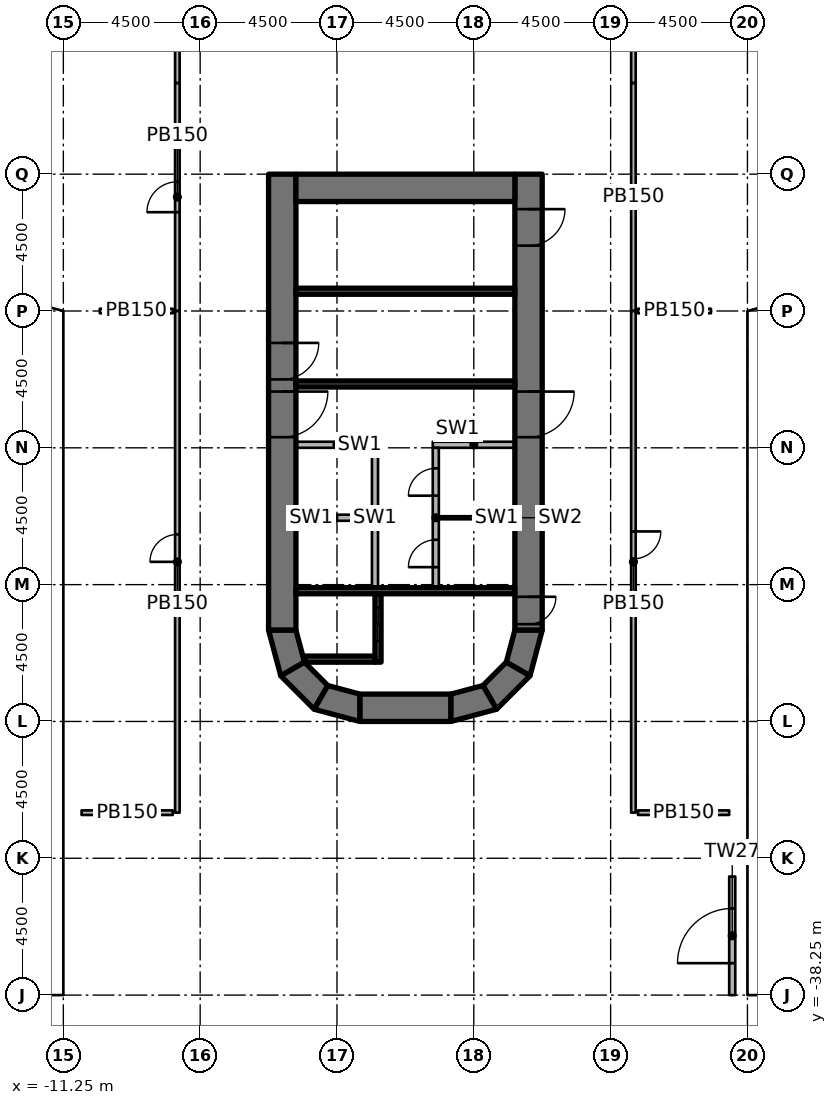
"""IFC4 building model, lengths in metres.
Left out: names, types, materials, properties, quantities, classifications, styles, units other than length and angle.
Written with IfcOpenShell. Run it as: python <this file> out.ifc"""

import sys

from ifc_helpers import new_model, si_unit, direction, frame, frame_2d, origin, origin_2d, place, context, subcontext, project, spatial, polyline, rectangle, outline, extrude, element, fill, save


model = new_model("IFC4")
c1 = context("Model", 3, precision=1e-05, world=origin(), true_north=direction((0.0, 1.0)))
c2 = subcontext(c1, "Body", "Model", "MODEL_VIEW")
j1 = project(units=[si_unit("LENGTHUNIT", "METRE"), si_unit("PLANEANGLEUNIT", "RADIAN")], contexts=[c1])
p1 = place(None, origin())
s1 = spatial("IfcSite", under=j1, at=p1, CompositionType="ELEMENT")
p2 = place(p1, origin())
s2 = spatial("IfcBuilding", under=s1, at=p2, CompositionType="ELEMENT")
p3 = place(p2, frame((0.0, 0.0, 22.0)))
s3 = spatial("IfcBuildingStorey", under=s2, at=p3, CompositionType="ELEMENT", Elevation=22.0)
for number, where, z_axis, x_axis in (
    (1, (-10.65, -38.85, 0.0), (0.0, 0.0, 1.0), (1.0, 0.0, 0.0)),
    (2, (-10.65, -24.75, 0.0), (0.0, 0.0, 1.0), (1.0, 0.0, 0.0)),
    (3, (-10.65, -15.15, 0.0), (0.0, 0.0, 1.0), (1.0, 0.0, 0.0)),
):
    element("IfcColumn", number, at=place(p3, frame(where, z_axis=z_axis, x_axis=x_axis)), inside=s3, PredefinedType="COLUMN", context=c2, shape_type="SweptSolid", body=[
        extrude(rectangle(XDim=1.2, YDim=1.2, at=origin_2d()), origin(), (0.0, 0.0, 1.0), 4.55),
    ])
for number, where, z_axis, x_axis in (
    (4, (-6.25, -26.9, 0.0), (0.0, 0.0, 1.0), (1.0, 0.0, 0.0)),
    (5, (-6.25, -24.65, 0.0), (0.0, 0.0, 1.0), (1.0, 0.0, 0.0)),
    (6, (-6.25, -20.25, 0.0), (0.0, 0.0, 1.0), (1.0, 0.0, 0.0)),
    (7, (-6.25, -15.75, 0.0), (0.0, 0.0, 1.0), (1.0, 0.0, 0.0)),
    (8, (-6.25, -10.75, 0.0), (0.0, 0.0, 1.0), (1.0, 0.0, 0.0)),
    (9, (-2.25, -33.11, 0.0), (0.0, 0.0, 1.0), (1.0, 0.0, 0.0)),
    (10, (2.25, -33.11, 0.0), (0.0, 0.0, 1.0), (1.0, 0.0, 0.0)),
    (11, (6.25, -26.9, 0.0), (0.0, 0.0, 1.0), (1.0, 0.0, 0.0)),
    (12, (6.25, -24.65, 0.0), (0.0, 0.0, 1.0), (1.0, 0.0, 0.0)),
    (13, (6.25, -20.25, 0.0), (0.0, 0.0, 1.0), (1.0, 0.0, 0.0)),
    (14, (6.25, -15.75, 0.0), (0.0, 0.0, 1.0), (1.0, 0.0, 0.0)),
    (15, (6.25, -10.75, 0.0), (0.0, 0.0, 1.0), (1.0, 0.0, 0.0)),
):
    element("IfcColumn", number, at=place(p3, frame(where, z_axis=z_axis, x_axis=x_axis)), inside=s3, PredefinedType="COLUMN", context=c2, shape_type="SweptSolid", body=[
        extrude(rectangle(XDim=1.2, YDim=1.2, at=origin_2d()), origin(), (0.0, 0.0, 1.0), 4.85),
    ])
for number, where, z_axis, x_axis in (
    (16, (10.65, -38.85, 0.0), (0.0, 0.0, 1.0), (1.0, 0.0, 0.0)),
    (17, (10.65, -33.75, 0.0), (0.0, 0.0, 1.0), (1.0, 0.0, 0.0)),
    (18, (10.65, -20.25, 0.0), (0.0, 0.0, 1.0), (1.0, 0.0, 0.0)),
    (19, (10.65, -15.15, 0.0), (0.0, 0.0, 1.0), (1.0, 0.0, 0.0)),
):
    element("IfcColumn", number, at=place(p3, frame(where, z_axis=z_axis, x_axis=x_axis)), inside=s3, PredefinedType="COLUMN", context=c2, shape_type="SweptSolid", body=[
        extrude(rectangle(XDim=1.2, YDim=1.2, at=origin_2d()), origin(), (0.0, 0.0, 1.0), 4.55),
    ])
p4 = place(p3, frame((-4.05, -11.25, 0.0), z_axis=(0.0, 0.0, 1.0), x_axis=(0.0, -1.0, 0.0)))
e20 = element("IfcWall", 20, at=p4, inside=s3, PredefinedType="SHEAR", context=c2, shape_type="SweptSolid", body=[
    extrude(rectangle(XDim=15.0, YDim=0.9, at=frame_2d((7.5, 0.0))), origin(), (0.0, 0.0, 1.0), 5.0),
])
p5 = place(p4, frame((7.15, 0.0, 0.0)))
e21 = element("IfcOpeningElement", 21, at=p5, cuts=e20, PredefinedType="OPENING", context=c2, shape_type="SweptSolid", body=[
    extrude(rectangle(XDim=1.5, YDim=2.3, at=frame_2d((0.75, 1.15))), frame((0.0, 0.46, 0.0), z_axis=(0.0, -1.0, 0.0), x_axis=(1.0, 0.0, 0.0)), (0.0, 0.0, 1.0), 0.92),
])
p6 = place(p4, frame((5.55, 0.0, 0.0)))
e22 = element("IfcOpeningElement", 22, at=p6, cuts=e20, PredefinedType="OPENING", context=c2, shape_type="SweptSolid", body=[
    extrude(rectangle(XDim=1.2, YDim=2.1, at=frame_2d((0.6, 1.05))), frame((0.0, 0.46, 0.0), z_axis=(0.0, -1.0, 0.0), x_axis=(1.0, 0.0, 0.0)), (0.0, 0.0, 1.0), 0.92),
])
p7 = place(p3, frame((4.05, -11.25, 0.0), z_axis=(0.0, 0.0, 1.0), x_axis=(0.0, -1.0, 0.0)))
e23 = element("IfcWall", 23, at=p7, inside=s3, PredefinedType="SHEAR", context=c2, shape_type="SweptSolid", body=[
    extrude(rectangle(XDim=15.0, YDim=0.9, at=frame_2d((7.5, 0.0))), origin(), (0.0, 0.0, 1.0), 5.0),
])
p8 = place(p7, frame((7.15, 0.0, 0.0)))
e24 = element("IfcOpeningElement", 24, at=p8, cuts=e23, PredefinedType="OPENING", context=c2, shape_type="SweptSolid", body=[
    extrude(rectangle(XDim=1.5, YDim=2.3, at=frame_2d((0.75, 1.15))), frame((0.0, 0.46, 0.0), z_axis=(0.0, -1.0, 0.0), x_axis=(1.0, 0.0, 0.0)), (0.0, 0.0, 1.0), 0.92),
])
p9 = place(p7, frame((13.9, 0.0, 0.0)))
e25 = element("IfcOpeningElement", 25, at=p9, cuts=e23, PredefinedType="OPENING", context=c2, shape_type="SweptSolid", body=[
    extrude(rectangle(XDim=0.9, YDim=2.1, at=frame_2d((0.45, 1.05))), frame((0.0, 0.46, 0.0), z_axis=(0.0, -1.0, 0.0), x_axis=(1.0, 0.0, 0.0)), (0.0, 0.0, 1.0), 0.92),
])
p10 = place(p7, frame((1.15, 0.0, 0.0)))
e26 = element("IfcOpeningElement", 26, at=p10, cuts=e23, PredefinedType="OPENING", context=c2, shape_type="SweptSolid", body=[
    extrude(rectangle(XDim=1.2, YDim=2.1, at=frame_2d((0.6, 1.05))), frame((0.0, 0.46, 0.0), z_axis=(0.0, -1.0, 0.0), x_axis=(1.0, 0.0, 0.0)), (0.0, 0.0, 1.0), 0.92),
])
p11 = place(p3, frame((-3.6, -11.7, 0.0), z_axis=(0.0, 0.0, 1.0), x_axis=(1.0, 0.0, 0.0)))
e27 = element("IfcWall", 27, at=p11, inside=s3, PredefinedType="SHEAR", context=c2, shape_type="SweptSolid", body=[
    extrude(rectangle(XDim=7.2, YDim=0.9, at=frame_2d((3.6, 0.0))), origin(), (0.0, 0.0, 1.0), 5.0),
])
p12 = place(p3, frame((-1.5, -28.8, 0.0), z_axis=(0.0, 0.0, 1.0), x_axis=(1.0, 0.0, 0.0)))
e28 = element("IfcWall", 28, at=p12, inside=s3, PredefinedType="SHEAR", context=c2, shape_type="SweptSolid", body=[
    extrude(rectangle(XDim=3.0, YDim=0.9, at=frame_2d((1.5, 0.0))), origin(), (0.0, 0.0, 1.0), 5.0),
])
p13 = place(p3, origin())
e29 = element("IfcWall", 29, at=p13, inside=s3, PredefinedType="SHEAR", context=c2, shape_type="SweptSolid", body=[
    extrude(outline(polyline([(-4.5, -26.25), (-4.098, -27.75), (-3.319, -27.3), (-3.6, -26.25), (-4.5, -26.25)])), origin(), (0.0, 0.0, 1.0), 5.0),
])
p14 = place(p3, origin())
e30 = element("IfcWall", 30, at=p14, inside=s3, PredefinedType="SHEAR", context=c2, shape_type="SweptSolid", body=[
    extrude(outline(polyline([(-4.098, -27.75), (-3.0, -28.848), (-2.55, -28.069), (-3.319, -27.3), (-4.098, -27.75)])), origin(), (0.0, 0.0, 1.0), 5.0),
])
p15 = place(p3, origin())
e31 = element("IfcWall", 31, at=p15, inside=s3, PredefinedType="SHEAR", context=c2, shape_type="SweptSolid", body=[
    extrude(outline(polyline([(-3.0, -28.848), (-1.5, -29.25), (-1.5, -28.35), (-2.55, -28.069), (-3.0, -28.848)])), origin(), (0.0, 0.0, 1.0), 5.0),
])
p16 = place(p3, origin())
e32 = element("IfcWall", 32, at=p16, inside=s3, PredefinedType="SHEAR", context=c2, shape_type="SweptSolid", body=[
    extrude(outline(polyline([(4.5, -26.25), (4.098, -27.75), (3.319, -27.3), (3.6, -26.25), (4.5, -26.25)])), origin(), (0.0, 0.0, 1.0), 5.0),
])
p17 = place(p3, origin())
e33 = element("IfcWall", 33, at=p17, inside=s3, PredefinedType="SHEAR", context=c2, shape_type="SweptSolid", body=[
    extrude(outline(polyline([(4.098, -27.75), (3.0, -28.848), (2.55, -28.069), (3.319, -27.3), (4.098, -27.75)])), origin(), (0.0, 0.0, 1.0), 5.0),
])
p18 = place(p3, origin())
e34 = element("IfcWall", 34, at=p18, inside=s3, PredefinedType="SHEAR", context=c2, shape_type="SweptSolid", body=[
    extrude(outline(polyline([(3.0, -28.848), (1.5, -29.25), (1.5, -28.35), (2.55, -28.069), (3.0, -28.848)])), origin(), (0.0, 0.0, 1.0), 5.0),
])
p19 = place(p3, frame((10.75, -38.25, 0.0), z_axis=(0.0, 0.0, 1.0), x_axis=(0.0, 1.0, 0.0)))
e35 = element("IfcWall", 35, at=p19, inside=s3, PredefinedType="SOLIDWALL", context=c2, shape_type="SweptSolid", body=[
    extrude(rectangle(XDim=3.9, YDim=0.2, at=frame_2d((1.95, 0.0))), origin(), (0.0, 0.0, 1.0), 3.95),
])
p20 = place(p19, frame((1.05, 0.0, 0.0)))
e36 = element("IfcOpeningElement", 36, at=p20, cuts=e35, PredefinedType="OPENING", context=c2, shape_type="SweptSolid", body=[
    extrude(rectangle(XDim=1.8, YDim=2.4, at=frame_2d((0.9, 1.2))), frame((0.0, 0.11, 0.0), z_axis=(0.0, -1.0, 0.0), x_axis=(1.0, 0.0, 0.0)), (0.0, 0.0, 1.0), 0.22),
])
p21 = place(p3, frame((3.6, -24.95, 0.0), z_axis=(0.0, 0.0, 1.0), x_axis=(-1.0, 0.0, 0.0)))
e37 = element("IfcWall", 37, at=p21, inside=s3, PredefinedType="SHEAR", context=c2, shape_type="SweptSolid", body=[
    extrude(rectangle(XDim=7.2, YDim=0.2, at=frame_2d((3.6, 0.0))), origin(), (0.0, 0.0, 1.0), 4.85),
])
p22 = place(p3, frame((-0.9, -27.3, 0.0), z_axis=(0.0, 0.0, 1.0), x_axis=(0.0, 1.0, 0.0)))
e38 = element("IfcWall", 38, at=p22, inside=s3, PredefinedType="SHEAR", context=c2, shape_type="SweptSolid", body=[
    extrude(rectangle(XDim=2.25, YDim=0.2, at=frame_2d((1.125, 0.0))), origin(), (0.0, 0.0, 1.0), 4.85),
])
p23 = place(p22, frame((0.7, 0.0, 0.0)))
e39 = element("IfcOpeningElement", 39, at=p23, cuts=e38, PredefinedType="OPENING", context=c2, shape_type="SweptSolid", body=[
    extrude(rectangle(XDim=1.1, YDim=2.3, at=frame_2d((0.55, 1.15))), frame((0.0, 0.11, 0.0), z_axis=(0.0, -1.0, 0.0), x_axis=(1.0, 0.0, 0.0)), (0.0, 0.0, 1.0), 0.22),
])
p24 = place(p3, origin())
e40 = element("IfcWall", 40, at=p24, inside=s3, PredefinedType="SHEAR", context=c2, shape_type="SweptSolid", body=[
    extrude(outline(polyline([(-1.0, -27.1), (-3.341, -27.1), (-3.291, -27.284), (-3.275, -27.3), (-1.0, -27.3), (-1.0, -27.1)])), origin(), (0.0, 0.0, 1.0), 4.85),
])
for number, where, z_axis, x_axis in (
    (41, (3.6, -18.15, 0.0), (0.0, 0.0, 1.0), (-1.0, 0.0, 0.0)),
    (42, (3.6, -15.1, 0.0), (0.0, 0.0, 1.0), (-1.0, 0.0, 0.0)),
):
    element("IfcWall", number, at=place(p3, frame(where, z_axis=z_axis, x_axis=x_axis)), inside=s3, PredefinedType="SHEAR", context=c2, shape_type="SweptSolid", body=[
        extrude(rectangle(XDim=7.2, YDim=0.2, at=frame_2d((3.6, 0.0))), origin(), (0.0, 0.0, 1.0), 4.85),
    ])
p25 = place(p3, frame((3.6, -20.15, 0.0), z_axis=(0.0, 0.0, 1.0), x_axis=(-1.0, 0.0, 0.0)))
e43 = element("IfcWall", 43, at=p25, inside=s3, PredefinedType="PARTITIONING", context=c2, shape_type="SweptSolid", body=[
    extrude(rectangle(XDim=2.7, YDim=0.2, at=frame_2d((1.35, 0.0))), origin(), (0.0, 0.0, 1.0), 4.85),
])
p26 = place(p3, frame((1.0, -24.85, 0.0), z_axis=(0.0, 0.0, 1.0), x_axis=(0.0, 1.0, 0.0)))
e44 = element("IfcWall", 44, at=p26, inside=s3, PredefinedType="PARTITIONING", context=c2, shape_type="SweptSolid", body=[
    extrude(rectangle(XDim=4.6, YDim=0.2, at=frame_2d((2.3, 0.0))), origin(), (0.0, 0.0, 1.0), 4.85),
])
p27 = place(p26, frame((0.675, 0.0, 0.0)))
e45 = element("IfcOpeningElement", 45, at=p27, cuts=e44, PredefinedType="OPENING", context=c2, shape_type="SweptSolid", body=[
    extrude(rectangle(XDim=0.9, YDim=2.1, at=frame_2d((0.45, 1.05))), frame((0.0, 0.11, 0.0), z_axis=(0.0, -1.0, 0.0), x_axis=(1.0, 0.0, 0.0)), (0.0, 0.0, 1.0), 0.22),
])
p28 = place(p26, frame((3.025, 0.0, 0.0)))
e46 = element("IfcOpeningElement", 46, at=p28, cuts=e44, PredefinedType="OPENING", context=c2, shape_type="SweptSolid", body=[
    extrude(rectangle(XDim=0.9, YDim=2.1, at=frame_2d((0.45, 1.05))), frame((0.0, 0.11, 0.0), z_axis=(0.0, -1.0, 0.0), x_axis=(1.0, 0.0, 0.0)), (0.0, 0.0, 1.0), 0.22),
])
p29 = place(p3, frame((-0.9, -20.15, 0.0), z_axis=(0.0, 0.0, 1.0), x_axis=(-1.0, 0.0, 0.0)))
e47 = element("IfcWall", 47, at=p29, inside=s3, PredefinedType="PARTITIONING", context=c2, shape_type="SweptSolid", body=[
    extrude(rectangle(XDim=2.7, YDim=0.2, at=frame_2d((1.35, 0.0))), origin(), (0.0, 0.0, 1.0), 4.85),
])
p30 = place(p3, frame((-1.0, -24.85, 0.0), z_axis=(0.0, 0.0, 1.0), x_axis=(0.0, 1.0, 0.0)))
e48 = element("IfcWall", 48, at=p30, inside=s3, PredefinedType="PARTITIONING", context=c2, shape_type="SweptSolid", body=[
    extrude(rectangle(XDim=4.6, YDim=0.2, at=frame_2d((2.3, 0.0))), origin(), (0.0, 0.0, 1.0), 4.85),
])
p31 = place(p3, frame((3.6, -22.55, 0.0), z_axis=(0.0, 0.0, 1.0), x_axis=(-1.0, 0.0, 0.0)))
e49 = element("IfcWall", 49, at=p31, inside=s3, PredefinedType="PARTITIONING", context=c2, shape_type="SweptSolid", body=[
    extrude(rectangle(XDim=2.5, YDim=0.1, at=frame_2d((1.25, 0.0))), origin(), (0.0, 0.0, 1.0), 4.85),
])
p32 = place(p3, frame((-1.1, -22.55, 0.0), z_axis=(0.0, 0.0, 1.0), x_axis=(-1.0, 0.0, 0.0)))
e50 = element("IfcWall", 50, at=p32, inside=s3, PredefinedType="PARTITIONING", context=c2, shape_type="SweptSolid", body=[
    extrude(rectangle(XDim=2.5, YDim=0.2, at=frame_2d((1.25, 0.0))), origin(), (0.0, 0.0, 1.0), 4.85),
])
p33 = place(p3, frame((7.5, -8.25, 0.0), z_axis=(0.0, 0.0, 1.0), x_axis=(0.0, -1.0, 0.0)))
e51 = element("IfcWall", 51, at=p33, inside=s3, PredefinedType="PARTITIONING", context=c2, shape_type="SweptSolid", body=[
    extrude(rectangle(XDim=7.5, YDim=0.15, at=frame_2d((3.75, 0.0))), origin(), (0.0, 0.0, 1.0), 3.93),
])
p34 = place(p3, frame((7.5, -15.75, 0.0), z_axis=(0.0, 0.0, 1.0), x_axis=(0.0, -1.0, 0.0)))
e52 = element("IfcWall", 52, at=p34, inside=s3, PredefinedType="PARTITIONING", context=c2, shape_type="SweptSolid", body=[
    extrude(rectangle(XDim=16.5, YDim=0.15, at=frame_2d((8.25, 0.0))), origin(), (0.0, 0.0, 1.0), 4.55),
])
p35 = place(p34, frame((7.25, 0.0, 0.0)))
e53 = element("IfcOpeningElement", 53, at=p35, cuts=e52, PredefinedType="OPENING", context=c2, shape_type="SweptSolid", body=[
    extrude(rectangle(XDim=0.9, YDim=2.1, at=frame_2d((0.45, 1.05))), frame((0.0, 0.085, 0.0), z_axis=(0.0, -1.0, 0.0), x_axis=(1.0, 0.0, 0.0)), (0.0, 0.0, 1.0), 0.17),
])
p36 = place(p3, frame((-7.5, -15.75, 0.0), z_axis=(0.0, 0.0, 1.0), x_axis=(0.0, 1.0, 0.0)))
e54 = element("IfcWall", 54, at=p36, inside=s3, PredefinedType="PARTITIONING", context=c2, shape_type="SweptSolid", body=[
    extrude(rectangle(XDim=7.5, YDim=0.15, at=frame_2d((3.75, 0.0))), origin(), (0.0, 0.0, 1.0), 3.93),
])
p37 = place(p36, frame((3.25, 0.0, 0.0)))
e55 = element("IfcOpeningElement", 55, at=p37, cuts=e54, PredefinedType="OPENING", context=c2, shape_type="SweptSolid", body=[
    extrude(rectangle(XDim=1.0, YDim=2.1, at=frame_2d((0.5, 1.05))), frame((0.0, 0.085, 0.0), z_axis=(0.0, -1.0, 0.0), x_axis=(1.0, 0.0, 0.0)), (0.0, 0.0, 1.0), 0.17),
])
p38 = place(p3, frame((-7.5, -32.25, 0.0), z_axis=(0.0, 0.0, 1.0), x_axis=(0.0, 1.0, 0.0)))
e56 = element("IfcWall", 56, at=p38, inside=s3, PredefinedType="PARTITIONING", context=c2, shape_type="SweptSolid", body=[
    extrude(rectangle(XDim=16.5, YDim=0.15, at=frame_2d((8.25, 0.0))), origin(), (0.0, 0.0, 1.0), 4.55),
])
p39 = place(p38, frame((8.25, 0.0, 0.0)))
e57 = element("IfcOpeningElement", 57, at=p39, cuts=e56, PredefinedType="OPENING", context=c2, shape_type="SweptSolid", body=[
    extrude(rectangle(XDim=0.9, YDim=2.1, at=frame_2d((0.45, 1.05))), frame((0.0, 0.085, 0.0), z_axis=(0.0, -1.0, 0.0), x_axis=(1.0, 0.0, 0.0)), (0.0, 0.0, 1.0), 0.17),
])
p40 = place(p3, frame((10.05, -15.75, 0.0), z_axis=(0.0, 0.0, 1.0), x_axis=(-1.0, 0.0, 0.0)))
e58 = element("IfcWall", 58, at=p40, inside=s3, PredefinedType="PARTITIONING", context=c2, shape_type="SweptSolid", body=[
    extrude(rectangle(XDim=2.4, YDim=0.15, at=frame_2d((1.2, 0.0))), origin(), (0.0, 0.0, 1.0), 4.55),
])
p41 = place(p3, frame((7.5, -8.25, 0.0), z_axis=(0.0, 0.0, 1.0), x_axis=(0.0, 1.0, 0.0)))
e59 = element("IfcWall", 59, at=p41, inside=s3, PredefinedType="PARTITIONING", context=c2, shape_type="SweptSolid", body=[
    extrude(rectangle(XDim=6.6, YDim=0.15, at=frame_2d((3.3, 0.0))), origin(), (0.0, 0.0, 1.0), 3.911),
])
p42 = place(p3, frame((10.65, -32.25, 0.0), z_axis=(0.0, 0.0, 1.0), x_axis=(-1.0, 0.0, 0.0)))
e60 = element("IfcWall", 60, at=p42, inside=s3, PredefinedType="PARTITIONING", context=c2, shape_type="SweptSolid", body=[
    extrude(rectangle(XDim=3.0, YDim=0.15, at=frame_2d((1.5, 0.0))), origin(), (0.0, 0.0, 1.0), 4.55),
])
p43 = place(p3, frame((-7.65, -15.75, 0.0), z_axis=(0.0, 0.0, 1.0), x_axis=(-1.0, 0.0, 0.0)))
e61 = element("IfcWall", 61, at=p43, inside=s3, PredefinedType="PARTITIONING", context=c2, shape_type="SweptSolid", body=[
    extrude(rectangle(XDim=2.4, YDim=0.15, at=frame_2d((1.2, 0.0))), origin(), (0.0, 0.0, 1.0), 4.55),
])
p44 = place(p3, frame((-7.5, -1.65, 0.0), z_axis=(0.0, 0.0, 1.0), x_axis=(0.0, -1.0, 0.0)))
e62 = element("IfcWall", 62, at=p44, inside=s3, PredefinedType="PARTITIONING", context=c2, shape_type="SweptSolid", body=[
    extrude(rectangle(XDim=6.6, YDim=0.15, at=frame_2d((3.3, 0.0))), origin(), (0.0, 0.0, 1.0), 3.911),
])
p45 = place(p3, frame((-7.65, -32.25, 0.0), z_axis=(0.0, 0.0, 1.0), x_axis=(-1.0, 0.0, 0.0)))
e63 = element("IfcWall", 63, at=p45, inside=s3, PredefinedType="PARTITIONING", context=c2, shape_type="SweptSolid", body=[
    extrude(rectangle(XDim=3.0, YDim=0.15, at=frame_2d((1.5, 0.0))), origin(), (0.0, 0.0, 1.0), 4.55),
])
p46 = place(p20, origin())
e64 = element("IfcDoor", 64, at=p46, inside=s3, OperationType="SINGLE_SWING_LEFT", PredefinedType="DOOR", context=c2, shape_type="SweptSolid", body=[
    extrude(rectangle(XDim=1.8, YDim=2.4, at=frame_2d((0.9, 1.2))), frame((0.0, 0.025, 0.0), z_axis=(0.0, -1.0, 0.0), x_axis=(1.0, 0.0, 0.0)), (0.0, 0.0, 1.0), 0.05),
])
fill(e36, e64)
p47 = place(p8, origin())
e65 = element("IfcDoor", 65, at=p47, inside=s3, OperationType="DOUBLE_DOOR_SINGLE_SWING", PredefinedType="DOOR", context=c2, shape_type="SweptSolid", body=[
    extrude(rectangle(XDim=1.5, YDim=2.3, at=frame_2d((0.75, 1.15))), frame((0.0, 0.025, 0.0), z_axis=(0.0, -1.0, 0.0), x_axis=(1.0, 0.0, 0.0)), (0.0, 0.0, 1.0), 0.05),
])
fill(e24, e65)
p48 = place(p5, origin())
e66 = element("IfcDoor", 66, at=p48, inside=s3, OperationType="DOUBLE_DOOR_SINGLE_SWING", PredefinedType="DOOR", context=c2, shape_type="SweptSolid", body=[
    extrude(rectangle(XDim=1.5, YDim=2.3, at=frame_2d((0.75, 1.15))), frame((0.0, 0.025, 0.0), z_axis=(0.0, -1.0, 0.0), x_axis=(1.0, 0.0, 0.0)), (0.0, 0.0, 1.0), 0.05),
])
fill(e21, e66)
p49 = place(p9, origin())
e67 = element("IfcDoor", 67, at=p49, inside=s3, OperationType="SINGLE_SWING_RIGHT", PredefinedType="DOOR", context=c2, shape_type="SweptSolid", body=[
    extrude(rectangle(XDim=0.9, YDim=2.1, at=frame_2d((0.45, 1.05))), frame((0.0, 0.025, 0.0), z_axis=(0.0, -1.0, 0.0), x_axis=(1.0, 0.0, 0.0)), (0.0, 0.0, 1.0), 0.05),
])
fill(e25, e67)
p50 = place(p6, origin())
e68 = element("IfcDoor", 68, at=p50, inside=s3, OperationType="SINGLE_SWING_LEFT", PredefinedType="DOOR", context=c2, shape_type="SweptSolid", body=[
    extrude(rectangle(XDim=1.2, YDim=2.1, at=frame_2d((0.6, 1.05))), frame((0.0, 0.025, 0.0), z_axis=(0.0, -1.0, 0.0), x_axis=(1.0, 0.0, 0.0)), (0.0, 0.0, 1.0), 0.05),
])
fill(e22, e68)
p51 = place(p10, origin())
e69 = element("IfcDoor", 69, at=p51, inside=s3, OperationType="SINGLE_SWING_RIGHT", PredefinedType="DOOR", context=c2, shape_type="SweptSolid", body=[
    extrude(rectangle(XDim=1.2, YDim=2.1, at=frame_2d((0.6, 1.05))), frame((0.0, 0.025, 0.0), z_axis=(0.0, -1.0, 0.0), x_axis=(1.0, 0.0, 0.0)), (0.0, 0.0, 1.0), 0.05),
])
fill(e26, e69)
p52 = place(p23, origin())
e70 = element("IfcDoor", 70, at=p52, inside=s3, OperationType="DOUBLE_DOOR_SLIDING", PredefinedType="DOOR", context=c2, shape_type="SweptSolid", body=[
    extrude(rectangle(XDim=1.1, YDim=2.3, at=frame_2d((0.55, 1.15))), frame((0.0, 0.025, 0.0), z_axis=(0.0, -1.0, 0.0), x_axis=(1.0, 0.0, 0.0)), (0.0, 0.0, 1.0), 0.05),
])
fill(e39, e70)
p53 = place(p27, origin())
e71 = element("IfcDoor", 71, at=p53, inside=s3, OperationType="SINGLE_SWING_LEFT", PredefinedType="DOOR", context=c2, shape_type="SweptSolid", body=[
    extrude(rectangle(XDim=0.9, YDim=2.1, at=frame_2d((0.45, 1.05))), frame((0.0, 0.025, 0.0), z_axis=(0.0, -1.0, 0.0), x_axis=(1.0, 0.0, 0.0)), (0.0, 0.0, 1.0), 0.05),
])
fill(e45, e71)
p54 = place(p28, origin())
e72 = element("IfcDoor", 72, at=p54, inside=s3, OperationType="SINGLE_SWING_LEFT", PredefinedType="DOOR", context=c2, shape_type="SweptSolid", body=[
    extrude(rectangle(XDim=0.9, YDim=2.1, at=frame_2d((0.45, 1.05))), frame((0.0, 0.025, 0.0), z_axis=(0.0, -1.0, 0.0), x_axis=(1.0, 0.0, 0.0)), (0.0, 0.0, 1.0), 0.05),
])
fill(e46, e72)
p55 = place(p35, origin())
e73 = element("IfcDoor", 73, at=p55, inside=s3, OperationType="SINGLE_SWING_LEFT", PredefinedType="DOOR", context=c2, shape_type="SweptSolid", body=[
    extrude(rectangle(XDim=0.9, YDim=2.1, at=frame_2d((0.45, 1.05))), frame((0.0, 0.025, 0.0), z_axis=(0.0, -1.0, 0.0), x_axis=(1.0, 0.0, 0.0)), (0.0, 0.0, 1.0), 0.05),
])
fill(e53, e73)
p56 = place(p37, origin())
e74 = element("IfcDoor", 74, at=p56, inside=s3, OperationType="SINGLE_SWING_LEFT", PredefinedType="DOOR", context=c2, shape_type="SweptSolid", body=[
    extrude(rectangle(XDim=1.0, YDim=2.1, at=frame_2d((0.5, 1.05))), frame((0.0, 0.025, 0.0), z_axis=(0.0, -1.0, 0.0), x_axis=(1.0, 0.0, 0.0)), (0.0, 0.0, 1.0), 0.05),
])
fill(e55, e74)
p57 = place(p39, origin())
e75 = element("IfcDoor", 75, at=p57, inside=s3, OperationType="SINGLE_SWING_LEFT", PredefinedType="DOOR", context=c2, shape_type="SweptSolid", body=[
    extrude(rectangle(XDim=0.9, YDim=2.1, at=frame_2d((0.45, 1.05))), frame((0.0, 0.025, 0.0), z_axis=(0.0, -1.0, 0.0), x_axis=(1.0, 0.0, 0.0)), (0.0, 0.0, 1.0), 0.05),
])
fill(e57, e75)
save(model, sys.argv[1])
